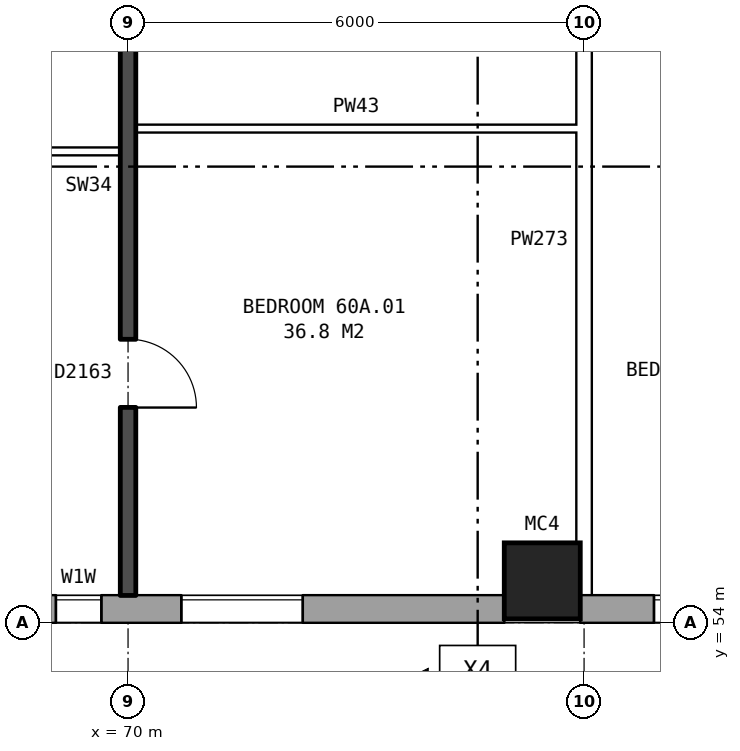
"""IFC4 building model, lengths in metres.
Left out: names, types, materials, properties, quantities, classifications, styles, units other than length and angle.
Written with IfcOpenShell. Run it as: python <this file> out.ifc"""

import sys

from ifc_helpers import new_model, si_unit, direction, frame, frame_2d, origin, origin_2d, place, context, subcontext, project, spatial, rectangle, hollow_rectangle, extrude, element, fill, save


model = new_model("IFC4")
c1 = context("Model", 3, precision=1e-05, world=origin(), true_north=direction((0.0, 1.0)))
c2 = subcontext(c1, "Body", "Model", "MODEL_VIEW")
j1 = project(units=[si_unit("LENGTHUNIT", "METRE"), si_unit("PLANEANGLEUNIT", "RADIAN")], contexts=[c1])
p1 = place(None, origin())
s1 = spatial("IfcSite", under=j1, at=p1, CompositionType="ELEMENT")
p2 = place(p1, origin())
s2 = spatial("IfcBuilding", under=s1, at=p2, CompositionType="ELEMENT")
p3 = place(p2, frame((0.0, 0.0, 212.1)))
s3 = spatial("IfcBuildingStorey", under=s2, at=p3, CompositionType="ELEMENT", Elevation=212.1)
p4 = place(p3, frame((75.45, 54.55, 0.0), z_axis=(0.0, 0.0, 1.0), x_axis=(1.0, 0.0, 0.0)))
e1 = element("IfcColumn", 1, at=p4, inside=s3, PredefinedType="COLUMN", context=c2, shape_type="SweptSolid", body=[
    extrude(hollow_rectangle(XDim=1.0, YDim=1.0, WallThickness=0.055, at=origin_2d()), origin(), (0.0, 0.0, 1.0), 3.1),
])
p5 = place(p3, frame((35.075, 54.18, 0.0), z_axis=(0.0, 0.0, 1.0), x_axis=(1.0, 0.0, 0.0)))
e2 = element("IfcWall", 2, at=p5, inside=s3, PredefinedType="STANDARD", context=c2, shape_type="SweptSolid", body=[
    extrude(rectangle(XDim=39.875, YDim=0.36, at=frame_2d((19.938, 0.0))), origin(), (0.0, 0.0, 1.0), 2.85),
])
p6 = place(p5, frame((0.3, 0.0, 0.8)))
e3 = element("IfcOpeningElement", 3, at=p6, cuts=e2, PredefinedType="OPENING", context=c2, shape_type="SweptSolid", body=[
    extrude(rectangle(XDim=0.8, YDim=1.5, at=frame_2d((0.4, 0.75))), frame((0.0, 0.19, 0.0), z_axis=(0.0, -1.0, 0.0), x_axis=(1.0, 0.0, 0.0)), (0.0, 0.0, 1.0), 0.38),
])
p7 = place(p5, frame((5.625, 0.0, 0.8)))
e4 = element("IfcOpeningElement", 4, at=p7, cuts=e2, PredefinedType="OPENING", context=c2, shape_type="SweptSolid", body=[
    extrude(rectangle(XDim=1.6, YDim=1.8, at=frame_2d((0.8, 0.9))), frame((0.0, 0.19, 0.0), z_axis=(0.0, -1.0, 0.0), x_axis=(1.0, 0.0, 0.0)), (0.0, 0.0, 1.0), 0.38),
])
p8 = place(p5, frame((8.625, 0.0, 0.8)))
e5 = element("IfcOpeningElement", 5, at=p8, cuts=e2, PredefinedType="OPENING", context=c2, shape_type="SweptSolid", body=[
    extrude(rectangle(XDim=1.6, YDim=1.8, at=frame_2d((0.8, 0.9))), frame((0.0, 0.19, 0.0), z_axis=(0.0, -1.0, 0.0), x_axis=(1.0, 0.0, 0.0)), (0.0, 0.0, 1.0), 0.38),
])
p9 = place(p5, frame((11.625, 0.0, 0.8)))
e6 = element("IfcOpeningElement", 6, at=p9, cuts=e2, PredefinedType="OPENING", context=c2, shape_type="SweptSolid", body=[
    extrude(rectangle(XDim=1.6, YDim=1.8, at=frame_2d((0.8, 0.9))), frame((0.0, 0.19, 0.0), z_axis=(0.0, -1.0, 0.0), x_axis=(1.0, 0.0, 0.0)), (0.0, 0.0, 1.0), 0.38),
])
p10 = place(p5, frame((14.625, 0.0, 0.8)))
e7 = element("IfcOpeningElement", 7, at=p10, cuts=e2, PredefinedType="OPENING", context=c2, shape_type="SweptSolid", body=[
    extrude(rectangle(XDim=1.6, YDim=1.8, at=frame_2d((0.8, 0.9))), frame((0.0, 0.19, 0.0), z_axis=(0.0, -1.0, 0.0), x_axis=(1.0, 0.0, 0.0)), (0.0, 0.0, 1.0), 0.38),
])
p11 = place(p5, frame((17.625, 0.0, 0.8)))
e8 = element("IfcOpeningElement", 8, at=p11, cuts=e2, PredefinedType="OPENING", context=c2, shape_type="SweptSolid", body=[
    extrude(rectangle(XDim=1.6, YDim=1.8, at=frame_2d((0.8, 0.9))), frame((0.0, 0.19, 0.0), z_axis=(0.0, -1.0, 0.0), x_axis=(1.0, 0.0, 0.0)), (0.0, 0.0, 1.0), 0.38),
])
p12 = place(p5, frame((20.625, 0.0, 0.8)))
e9 = element("IfcOpeningElement", 9, at=p12, cuts=e2, PredefinedType="OPENING", context=c2, shape_type="SweptSolid", body=[
    extrude(rectangle(XDim=1.6, YDim=1.8, at=frame_2d((0.8, 0.9))), frame((0.0, 0.19, 0.0), z_axis=(0.0, -1.0, 0.0), x_axis=(1.0, 0.0, 0.0)), (0.0, 0.0, 1.0), 0.38),
])
p13 = place(p5, frame((23.625, 0.0, 0.8)))
e10 = element("IfcOpeningElement", 10, at=p13, cuts=e2, PredefinedType="OPENING", context=c2, shape_type="SweptSolid", body=[
    extrude(rectangle(XDim=1.6, YDim=1.8, at=frame_2d((0.8, 0.9))), frame((0.0, 0.19, 0.0), z_axis=(0.0, -1.0, 0.0), x_axis=(1.0, 0.0, 0.0)), (0.0, 0.0, 1.0), 0.38),
])
p14 = place(p5, frame((26.625, 0.0, 0.8)))
e11 = element("IfcOpeningElement", 11, at=p14, cuts=e2, PredefinedType="OPENING", context=c2, shape_type="SweptSolid", body=[
    extrude(rectangle(XDim=1.6, YDim=1.8, at=frame_2d((0.8, 0.9))), frame((0.0, 0.19, 0.0), z_axis=(0.0, -1.0, 0.0), x_axis=(1.0, 0.0, 0.0)), (0.0, 0.0, 1.0), 0.38),
])
p15 = place(p5, frame((29.625, 0.0, 0.8)))
e12 = element("IfcOpeningElement", 12, at=p15, cuts=e2, PredefinedType="OPENING", context=c2, shape_type="SweptSolid", body=[
    extrude(rectangle(XDim=1.6, YDim=1.8, at=frame_2d((0.8, 0.9))), frame((0.0, 0.19, 0.0), z_axis=(0.0, -1.0, 0.0), x_axis=(1.0, 0.0, 0.0)), (0.0, 0.0, 1.0), 0.38),
])
p16 = place(p5, frame((31.525, 0.0, 0.8)))
e13 = element("IfcOpeningElement", 13, at=p16, cuts=e2, PredefinedType="OPENING", context=c2, shape_type="SweptSolid", body=[
    extrude(rectangle(XDim=0.8, YDim=1.5, at=frame_2d((0.4, 0.75))), frame((0.0, 0.19, 0.0), z_axis=(0.0, -1.0, 0.0), x_axis=(1.0, 0.0, 0.0)), (0.0, 0.0, 1.0), 0.38),
])
p17 = place(p5, frame((35.625, 0.0, 0.8)))
e14 = element("IfcOpeningElement", 14, at=p17, cuts=e2, PredefinedType="OPENING", context=c2, shape_type="SweptSolid", body=[
    extrude(rectangle(XDim=1.6, YDim=1.8, at=frame_2d((0.8, 0.9))), frame((0.0, 0.19, 0.0), z_axis=(0.0, -1.0, 0.0), x_axis=(1.0, 0.0, 0.0)), (0.0, 0.0, 1.0), 0.38),
])
p18 = place(p5, frame((1.4, 0.0, 0.8)))
e15 = element("IfcOpeningElement", 15, at=p18, cuts=e2, PredefinedType="OPENING", context=c2, shape_type="SweptSolid", body=[
    extrude(rectangle(XDim=1.4, YDim=1.8, at=frame_2d((0.7, 0.9))), frame((0.0, 0.19, 0.0), z_axis=(0.0, -1.0, 0.0), x_axis=(1.0, 0.0, 0.0)), (0.0, 0.0, 1.0), 0.38),
])
p19 = place(p5, frame((33.975, 0.0, 1.7)))
e16 = element("IfcOpeningElement", 16, at=p19, cuts=e2, PredefinedType="OPENING", context=c2, shape_type="SweptSolid", body=[
    extrude(rectangle(XDim=0.6, YDim=0.9, at=frame_2d((0.3, 0.45))), frame((0.0, 0.19, 0.0), z_axis=(0.0, -1.0, 0.0), x_axis=(1.0, 0.0, 0.0)), (0.0, 0.0, 1.0), 0.38),
])
p20 = place(p3, frame((75.95, 54.18, 0.0), z_axis=(0.0, 0.0, 1.0), x_axis=(1.0, 0.0, 0.0)))
e17 = element("IfcWall", 17, at=p20, inside=s3, PredefinedType="STANDARD", context=c2, shape_type="SweptSolid", body=[
    extrude(rectangle(XDim=55.1, YDim=0.36, at=frame_2d((27.55, 0.0))), origin(), (0.0, 0.0, 1.0), 2.85),
])
p21 = place(p20, frame((0.969, 0.0, 0.8)))
e18 = element("IfcOpeningElement", 18, at=p21, cuts=e17, PredefinedType="OPENING", context=c2, shape_type="SweptSolid", body=[
    extrude(rectangle(XDim=1.6, YDim=1.8, at=frame_2d((0.8, 0.9))), frame((0.0, 0.19, 0.0), z_axis=(0.0, -1.0, 0.0), x_axis=(1.0, 0.0, 0.0)), (0.0, 0.0, 1.0), 0.38),
])
p22 = place(p20, frame((4.406, 0.0, 0.8)))
e19 = element("IfcOpeningElement", 19, at=p22, cuts=e17, PredefinedType="OPENING", context=c2, shape_type="SweptSolid", body=[
    extrude(rectangle(XDim=1.6, YDim=1.8, at=frame_2d((0.8, 0.9))), frame((0.0, 0.19, 0.0), z_axis=(0.0, -1.0, 0.0), x_axis=(1.0, 0.0, 0.0)), (0.0, 0.0, 1.0), 0.38),
])
p23 = place(p20, frame((7.844, 0.0, 0.8)))
e20 = element("IfcOpeningElement", 20, at=p23, cuts=e17, PredefinedType="OPENING", context=c2, shape_type="SweptSolid", body=[
    extrude(rectangle(XDim=1.6, YDim=1.8, at=frame_2d((0.8, 0.9))), frame((0.0, 0.19, 0.0), z_axis=(0.0, -1.0, 0.0), x_axis=(1.0, 0.0, 0.0)), (0.0, 0.0, 1.0), 0.38),
])
p24 = place(p20, frame((11.281, 0.0, 0.8)))
e21 = element("IfcOpeningElement", 21, at=p24, cuts=e17, PredefinedType="OPENING", context=c2, shape_type="SweptSolid", body=[
    extrude(rectangle(XDim=1.6, YDim=1.8, at=frame_2d((0.8, 0.9))), frame((0.0, 0.19, 0.0), z_axis=(0.0, -1.0, 0.0), x_axis=(1.0, 0.0, 0.0)), (0.0, 0.0, 1.0), 0.38),
])
p25 = place(p20, frame((14.719, 0.0, 0.8)))
e22 = element("IfcOpeningElement", 22, at=p25, cuts=e17, PredefinedType="OPENING", context=c2, shape_type="SweptSolid", body=[
    extrude(rectangle(XDim=1.6, YDim=1.8, at=frame_2d((0.8, 0.9))), frame((0.0, 0.19, 0.0), z_axis=(0.0, -1.0, 0.0), x_axis=(1.0, 0.0, 0.0)), (0.0, 0.0, 1.0), 0.38),
])
p26 = place(p20, frame((18.156, 0.0, 0.8)))
e23 = element("IfcOpeningElement", 23, at=p26, cuts=e17, PredefinedType="OPENING", context=c2, shape_type="SweptSolid", body=[
    extrude(rectangle(XDim=1.6, YDim=1.8, at=frame_2d((0.8, 0.9))), frame((0.0, 0.19, 0.0), z_axis=(0.0, -1.0, 0.0), x_axis=(1.0, 0.0, 0.0)), (0.0, 0.0, 1.0), 0.38),
])
p27 = place(p20, frame((21.594, 0.0, 0.8)))
e24 = element("IfcOpeningElement", 24, at=p27, cuts=e17, PredefinedType="OPENING", context=c2, shape_type="SweptSolid", body=[
    extrude(rectangle(XDim=1.6, YDim=1.8, at=frame_2d((0.8, 0.9))), frame((0.0, 0.19, 0.0), z_axis=(0.0, -1.0, 0.0), x_axis=(1.0, 0.0, 0.0)), (0.0, 0.0, 1.0), 0.38),
])
p28 = place(p20, frame((25.031, 0.0, 0.8)))
e25 = element("IfcOpeningElement", 25, at=p28, cuts=e17, PredefinedType="OPENING", context=c2, shape_type="SweptSolid", body=[
    extrude(rectangle(XDim=1.6, YDim=1.8, at=frame_2d((0.8, 0.9))), frame((0.0, 0.19, 0.0), z_axis=(0.0, -1.0, 0.0), x_axis=(1.0, 0.0, 0.0)), (0.0, 0.0, 1.0), 0.38),
])
p29 = place(p20, frame((28.469, 0.0, 0.8)))
e26 = element("IfcOpeningElement", 26, at=p29, cuts=e17, PredefinedType="OPENING", context=c2, shape_type="SweptSolid", body=[
    extrude(rectangle(XDim=1.6, YDim=1.8, at=frame_2d((0.8, 0.9))), frame((0.0, 0.19, 0.0), z_axis=(0.0, -1.0, 0.0), x_axis=(1.0, 0.0, 0.0)), (0.0, 0.0, 1.0), 0.38),
])
p30 = place(p20, frame((31.906, 0.0, 0.8)))
e27 = element("IfcOpeningElement", 27, at=p30, cuts=e17, PredefinedType="OPENING", context=c2, shape_type="SweptSolid", body=[
    extrude(rectangle(XDim=1.6, YDim=1.8, at=frame_2d((0.8, 0.9))), frame((0.0, 0.19, 0.0), z_axis=(0.0, -1.0, 0.0), x_axis=(1.0, 0.0, 0.0)), (0.0, 0.0, 1.0), 0.38),
])
p31 = place(p20, frame((35.344, 0.0, 0.8)))
e28 = element("IfcOpeningElement", 28, at=p31, cuts=e17, PredefinedType="OPENING", context=c2, shape_type="SweptSolid", body=[
    extrude(rectangle(XDim=1.6, YDim=1.8, at=frame_2d((0.8, 0.9))), frame((0.0, 0.19, 0.0), z_axis=(0.0, -1.0, 0.0), x_axis=(1.0, 0.0, 0.0)), (0.0, 0.0, 1.0), 0.38),
])
p32 = place(p20, frame((38.781, 0.0, 0.8)))
e29 = element("IfcOpeningElement", 29, at=p32, cuts=e17, PredefinedType="OPENING", context=c2, shape_type="SweptSolid", body=[
    extrude(rectangle(XDim=1.6, YDim=1.8, at=frame_2d((0.8, 0.9))), frame((0.0, 0.19, 0.0), z_axis=(0.0, -1.0, 0.0), x_axis=(1.0, 0.0, 0.0)), (0.0, 0.0, 1.0), 0.38),
])
p33 = place(p20, frame((42.219, 0.0, 0.8)))
e30 = element("IfcOpeningElement", 30, at=p33, cuts=e17, PredefinedType="OPENING", context=c2, shape_type="SweptSolid", body=[
    extrude(rectangle(XDim=1.6, YDim=1.8, at=frame_2d((0.8, 0.9))), frame((0.0, 0.19, 0.0), z_axis=(0.0, -1.0, 0.0), x_axis=(1.0, 0.0, 0.0)), (0.0, 0.0, 1.0), 0.38),
])
p34 = place(p20, frame((45.656, 0.0, 0.8)))
e31 = element("IfcOpeningElement", 31, at=p34, cuts=e17, PredefinedType="OPENING", context=c2, shape_type="SweptSolid", body=[
    extrude(rectangle(XDim=1.6, YDim=1.8, at=frame_2d((0.8, 0.9))), frame((0.0, 0.19, 0.0), z_axis=(0.0, -1.0, 0.0), x_axis=(1.0, 0.0, 0.0)), (0.0, 0.0, 1.0), 0.38),
])
p35 = place(p20, frame((49.094, 0.0, 0.8)))
e32 = element("IfcOpeningElement", 32, at=p35, cuts=e17, PredefinedType="OPENING", context=c2, shape_type="SweptSolid", body=[
    extrude(rectangle(XDim=1.6, YDim=1.8, at=frame_2d((0.8, 0.9))), frame((0.0, 0.19, 0.0), z_axis=(0.0, -1.0, 0.0), x_axis=(1.0, 0.0, 0.0)), (0.0, 0.0, 1.0), 0.38),
])
p36 = place(p20, frame((52.531, 0.0, 0.8)))
e33 = element("IfcOpeningElement", 33, at=p36, cuts=e17, PredefinedType="OPENING", context=c2, shape_type="SweptSolid", body=[
    extrude(rectangle(XDim=1.6, YDim=1.8, at=frame_2d((0.8, 0.9))), frame((0.0, 0.19, 0.0), z_axis=(0.0, -1.0, 0.0), x_axis=(1.0, 0.0, 0.0)), (0.0, 0.0, 1.0), 0.38),
])
p37 = place(p3, frame((64.1, 60.2, 0.0), z_axis=(0.0, 0.0, 1.0), x_axis=(1.0, 0.0, 0.0)))
e34 = element("IfcWall", 34, at=p37, inside=s3, PredefinedType="PARTITIONING", context=c2, shape_type="SweptSolid", body=[
    extrude(rectangle(XDim=5.8, YDim=0.1, at=frame_2d((2.9, 0.0))), origin(), (0.0, 0.0, 1.0), 2.85),
])
p38 = place(p37, frame((3.6, 0.0, 0.0)))
e35 = element("IfcOpeningElement", 35, at=p38, cuts=e34, PredefinedType="OPENING", context=c2, shape_type="SweptSolid", body=[
    extrude(rectangle(XDim=0.9, YDim=2.1, at=frame_2d((0.45, 1.05))), frame((0.0, 0.06, 0.0), z_axis=(0.0, -1.0, 0.0), x_axis=(1.0, 0.0, 0.0)), (0.0, 0.0, 1.0), 0.12),
])
p39 = place(p37, frame((0.7, 0.0, 0.0)))
e36 = element("IfcOpeningElement", 36, at=p39, cuts=e34, PredefinedType="OPENING", context=c2, shape_type="SweptSolid", body=[
    extrude(rectangle(XDim=0.9, YDim=2.1, at=frame_2d((0.45, 1.05))), frame((0.0, 0.06, 0.0), z_axis=(0.0, -1.0, 0.0), x_axis=(1.0, 0.0, 0.0)), (0.0, 0.0, 1.0), 0.12),
])
p40 = place(p3, frame((70.1, 60.5, 0.0), z_axis=(0.0, 0.0, 1.0), x_axis=(1.0, 0.0, 0.0)))
e37 = element("IfcWall", 37, at=p40, inside=s3, PredefinedType="PARTITIONING", context=c2, shape_type="SweptSolid", body=[
    extrude(rectangle(XDim=5.8, YDim=0.1, at=frame_2d((2.9, 0.0))), origin(), (0.0, 0.0, 1.0), 2.85),
])
p41 = place(p3, frame((70.0, 54.36, 0.0), z_axis=(0.0, 0.0, 1.0), x_axis=(0.0, 1.0, 0.0)))
e38 = element("IfcWall", 38, at=p41, inside=s3, PredefinedType="SOLIDWALL", context=c2, shape_type="SweptSolid", body=[
    extrude(rectangle(XDim=9.44, YDim=0.2, at=frame_2d((4.72, 0.0))), origin(), (0.0, 0.0, 1.0), 2.85),
])
p42 = place(p41, frame((2.47, 0.0, 0.0)))
e39 = element("IfcOpeningElement", 39, at=p42, cuts=e38, PredefinedType="OPENING", context=c2, shape_type="SweptSolid", body=[
    extrude(rectangle(XDim=0.9, YDim=2.1, at=frame_2d((0.45, 1.05))), frame((0.0, 0.11, 0.0), z_axis=(0.0, -1.0, 0.0), x_axis=(1.0, 0.0, 0.0)), (0.0, 0.0, 1.0), 0.22),
])
p43 = place(p41, frame((7.39, 0.0, 0.0)))
e40 = element("IfcOpeningElement", 40, at=p43, cuts=e38, PredefinedType="OPENING", context=c2, shape_type="SweptSolid", body=[
    extrude(rectangle(XDim=0.8, YDim=2.1, at=frame_2d((0.4, 1.05))), frame((0.0, 0.11, 0.0), z_axis=(0.0, -1.0, 0.0), x_axis=(1.0, 0.0, 0.0)), (0.0, 0.0, 1.0), 0.22),
])
p44 = place(p3, frame((76.0, 54.36, 0.0), z_axis=(0.0, 0.0, 1.0), x_axis=(0.0, 1.0, 0.0)))
e41 = element("IfcWall", 41, at=p44, inside=s3, PredefinedType="PARTITIONING", context=c2, shape_type="SweptSolid", body=[
    extrude(rectangle(XDim=9.34, YDim=0.2, at=frame_2d((4.67, 0.0))), origin(), (0.0, 0.0, 1.0), 2.85),
])
p45 = place(p17, origin())
e42 = element("IfcWindow", 42, at=p45, inside=s3, PartitioningType="SINGLE_PANEL", PredefinedType="WINDOW", context=c2, shape_type="SweptSolid", body=[
    extrude(rectangle(XDim=1.6, YDim=1.8, at=frame_2d((0.8, 0.9))), frame((0.0, 0.15, 0.0), z_axis=(0.0, -1.0, 0.0), x_axis=(1.0, 0.0, 0.0)), (0.0, 0.0, 1.0), 0.06),
])
fill(e14, e42)
p46 = place(p21, origin())
e43 = element("IfcWindow", 43, at=p46, inside=s3, PartitioningType="SINGLE_PANEL", PredefinedType="WINDOW", context=c2, shape_type="SweptSolid", body=[
    extrude(rectangle(XDim=1.6, YDim=1.8, at=frame_2d((0.8, 0.9))), frame((0.0, 0.15, 0.0), z_axis=(0.0, -1.0, 0.0), x_axis=(1.0, 0.0, 0.0)), (0.0, 0.0, 1.0), 0.06),
])
fill(e18, e43)
p47 = place(p42, frame((0.9, 0.0, 0.0), z_axis=(0.0, 0.0, 1.0), x_axis=(-1.0, 0.0, 0.0)))
e44 = element("IfcDoor", 44, at=p47, inside=s3, OperationType="SINGLE_SWING_RIGHT", PredefinedType="DOOR", context=c2, shape_type="SweptSolid", body=[
    extrude(rectangle(XDim=0.9, YDim=2.1, at=frame_2d((0.45, 1.05))), frame((0.0, 0.025, 0.0), z_axis=(0.0, -1.0, 0.0), x_axis=(1.0, 0.0, 0.0)), (0.0, 0.0, 1.0), 0.05),
])
fill(e39, e44)
p48 = place(p19, origin())
e45 = element("IfcWindow", 45, at=p48, inside=s3, PartitioningType="SINGLE_PANEL", PredefinedType="WINDOW", context=c2, shape_type="SweptSolid", body=[
    extrude(rectangle(XDim=0.6, YDim=0.9, at=frame_2d((0.3, 0.45))), frame((0.0, 0.15, 0.0), z_axis=(0.0, -1.0, 0.0), x_axis=(1.0, 0.0, 0.0)), (0.0, 0.0, 1.0), 0.06),
])
fill(e16, e45)
save(model, sys.argv[1])
